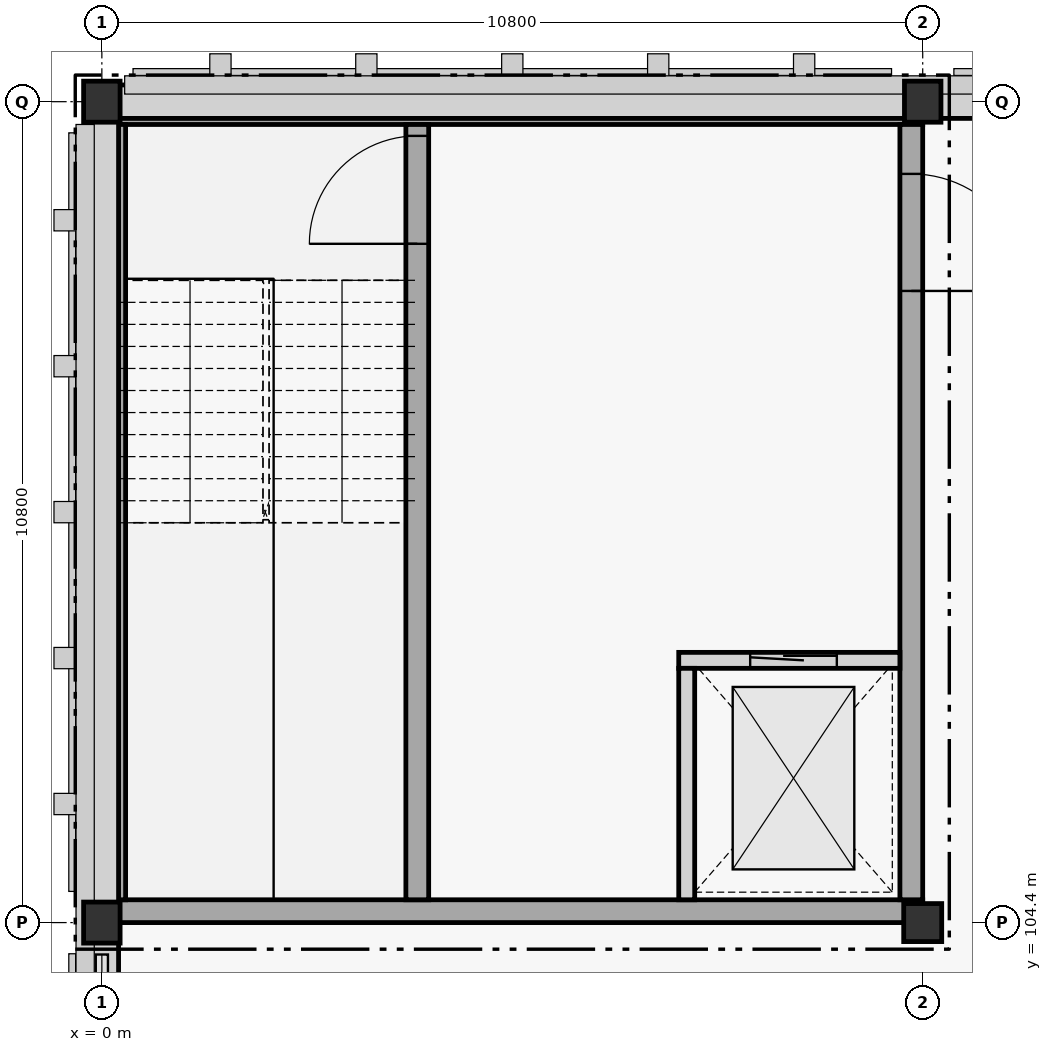
"""IFC4 building model, lengths in metres.
Left out: names, types, materials, properties, quantities, classifications, styles, units other than length and angle.
Written with IfcOpenShell. Run it as: python <this file> out.ifc"""

import sys

from ifc_helpers import new_model, si_unit, direction, frame, frame_2d, origin, origin_2d, place, context, subcontext, project, spatial, rectangle, extrude, element, fill, save


model = new_model("IFC4")
c1 = context("Model", 3, precision=1e-05, world=origin(), true_north=direction((0.0, 1.0)))
c2 = subcontext(c1, "Body", "Model", "MODEL_VIEW")
j1 = project(units=[si_unit("LENGTHUNIT", "METRE"), si_unit("PLANEANGLEUNIT", "RADIAN")], contexts=[c1])
p1 = place(None, origin())
s1 = spatial("IfcSite", under=j1, at=p1, CompositionType="ELEMENT")
p2 = place(p1, origin())
s2 = spatial("IfcBuilding", under=s1, at=p2, CompositionType="ELEMENT")
p3 = place(p2, frame((0.0, 0.0, 19.2)))
s3 = spatial("IfcBuildingStorey", under=s2, at=p3, CompositionType="ELEMENT", Elevation=19.2)
for number, where, z_axis, x_axis in (
    (1, (0.0, 104.4, 0.0), (0.0, 0.0, 1.0), (1.0, 0.0, 0.0)),
    (2, (0.0, 115.2, 0.0), (0.0, 0.0, 1.0), (1.0, 0.0, 0.0)),
):
    element("IfcColumn", number, at=place(p3, frame(where, z_axis=z_axis, x_axis=x_axis)), inside=s3, PredefinedType="COLUMN", context=c2, shape_type="SweptSolid", body=[
        extrude(rectangle(XDim=0.48, YDim=0.54, at=origin_2d()), origin(), (0.0, 0.0, 1.0), 4.2),
    ])
p4 = place(p3, frame((10.8, 104.4, 0.0), z_axis=(0.0, 0.0, 1.0), x_axis=(1.0, 0.0, 0.0)))
e3 = element("IfcColumn", 3, at=p4, inside=s3, PredefinedType="COLUMN", context=c2, shape_type="SweptSolid", body=[
    extrude(rectangle(XDim=0.5, YDim=0.5, at=origin_2d()), origin(), (0.0, 0.0, 1.0), 4.2),
])
p5 = place(p3, frame((10.8, 115.2, 0.0), z_axis=(0.0, 0.0, 1.0), x_axis=(1.0, 0.0, 0.0)))
e4 = element("IfcColumn", 4, at=p5, inside=s3, PredefinedType="COLUMN", context=c2, shape_type="SweptSolid", body=[
    extrude(rectangle(XDim=0.48, YDim=0.54, at=origin_2d()), origin(), (0.0, 0.0, 1.0), 4.2),
])
for number, where, z_axis, x_axis in (
    (5, (10.8, 104.55, 0.0), (0.0, 0.0, 1.0), (-1.0, 0.0, 0.0)),
    (6, (0.0, 115.05, 0.0), (0.0, 0.0, 1.0), (1.0, 0.0, 0.0)),
):
    element("IfcWall", number, at=place(p3, frame(where, z_axis=z_axis, x_axis=x_axis)), inside=s3, PredefinedType="SHEAR", context=c2, shape_type="SweptSolid", body=[
        extrude(rectangle(XDim=10.8, YDim=0.3, at=frame_2d((5.4, 0.0))), origin(), (0.0, 0.0, 1.0), 4.2),
    ])
p6 = place(p3, frame((0.15, 104.7, 0.0), z_axis=(0.0, 0.0, 1.0), x_axis=(0.0, 1.0, 0.0)))
e7 = element("IfcWall", 7, at=p6, inside=s3, PredefinedType="SHEAR", context=c2, shape_type="SweptSolid", body=[
    extrude(rectangle(XDim=10.2, YDim=0.325, at=frame_2d((5.1, 0.0))), origin(), (0.0, 0.0, 1.0), 4.2),
])
p7 = place(p3, frame((10.65, 114.9, 0.0), z_axis=(0.0, 0.0, 1.0), x_axis=(0.0, -1.0, 0.0)))
e8 = element("IfcWall", 8, at=p7, inside=s3, PredefinedType="SHEAR", context=c2, shape_type="SweptSolid", body=[
    extrude(rectangle(XDim=10.2, YDim=0.3, at=frame_2d((5.1, 0.0))), origin(), (0.0, 0.0, 1.0), 4.2),
])
p8 = place(p7, frame((0.65, 0.0, 0.0)))
e9 = element("IfcOpeningElement", 9, at=p8, cuts=e8, PredefinedType="OPENING", context=c2, shape_type="SweptSolid", body=[
    extrude(rectangle(XDim=1.54, YDim=2.22, at=frame_2d((0.77, 1.11))), frame((0.0, 0.15, 0.0), z_axis=(0.0, -1.0, 0.0), x_axis=(1.0, 0.0, 0.0)), (0.0, 0.0, 1.0), 0.3),
])
p9 = place(p3, frame((4.15, 104.7, 0.0), z_axis=(0.0, 0.0, 1.0), x_axis=(0.0, 1.0, 0.0)))
e10 = element("IfcWall", 10, at=p9, inside=s3, PredefinedType="SHEAR", context=c2, shape_type="SweptSolid", body=[
    extrude(rectangle(XDim=10.2, YDim=0.3, at=frame_2d((5.1, 0.0))), origin(), (0.0, 0.0, 1.0), 4.2),
])
p10 = place(p9, frame((8.63, 0.0, 0.0)))
e11 = element("IfcOpeningElement", 11, at=p10, cuts=e10, PredefinedType="OPENING", context=c2, shape_type="SweptSolid", body=[
    extrude(rectangle(XDim=1.42, YDim=2.2, at=frame_2d((0.71, 1.1))), frame((0.0, 0.15, 0.0), z_axis=(0.0, -1.0, 0.0), x_axis=(1.0, 0.0, 0.0)), (0.0, 0.0, 1.0), 0.3),
])
p11 = place(p3, frame((11.036, 115.2, 0.0), z_axis=(0.0, 0.0, 1.0), x_axis=(1.0, 0.0, 0.0)))
e12 = element("IfcWall", 12, at=p11, inside=s3, PredefinedType="STANDARD", context=c2, shape_type="SweptSolid", body=[
    extrude(rectangle(XDim=10.328, YDim=0.38, at=frame_2d((5.164, 0.0))), origin(), (0.0, 0.0, 1.0), 3.155),
])
p12 = place(p11, frame((4.604, 0.0, 0.9)))
e13 = element("IfcOpeningElement", 13, at=p12, cuts=e12, PredefinedType="OPENING", context=c2, shape_type="SweptSolid", body=[
    extrude(rectangle(XDim=1.12, YDim=2.02, at=frame_2d((0.56, 1.01))), frame((0.0, 0.19, 0.0), z_axis=(0.0, -1.0, 0.0), x_axis=(1.0, 0.0, 0.0)), (0.0, 0.0, 1.0), 0.38),
])
p13 = place(p3, frame((0.1, 115.2, 4.2), z_axis=(0.0, 0.0, 1.0), x_axis=(1.0, 0.0, 0.0)))
e14 = element("IfcWall", 14, at=p13, inside=s3, PredefinedType="PARAPET", context=c2, shape_type="SweptSolid", body=[
    extrude(rectangle(XDim=64.6, YDim=0.44, at=frame_2d((32.3, 0.0))), origin(), (0.0, 0.0, 1.0), 0.95),
])
p14 = place(p3, frame((0.0, 97.3, 4.2), z_axis=(0.0, 0.0, 1.0), x_axis=(0.0, 1.0, 0.0)))
e15 = element("IfcWall", 15, at=p14, inside=s3, PredefinedType="PARAPET", context=c2, shape_type="SweptSolid", body=[
    extrude(rectangle(XDim=17.8, YDim=0.44, at=frame_2d((8.9, 0.0))), origin(), (0.0, 0.0, 1.0), 0.95),
])
p15 = place(p3, frame((7.59, 107.85, 0.0), z_axis=(0.0, 0.0, 1.0), x_axis=(1.0, 0.0, 0.0)))
e16 = element("IfcWall", 16, at=p15, inside=s3, PredefinedType="STANDARD", context=c2, shape_type="SweptSolid", body=[
    extrude(rectangle(XDim=2.91, YDim=0.21, at=frame_2d((1.455, 0.0))), origin(), (0.0, 0.0, 1.0), 4.2),
])
p16 = place(p15, frame((0.94, 0.0, 0.0)))
e17 = element("IfcOpeningElement", 17, at=p16, cuts=e16, PredefinedType="OPENING", context=c2, shape_type="SweptSolid", body=[
    extrude(rectangle(XDim=1.14, YDim=2.16, at=frame_2d((0.57, 1.08))), frame((0.0, 0.105, 0.0), z_axis=(0.0, -1.0, 0.0), x_axis=(1.0, 0.0, 0.0)), (0.0, 0.0, 1.0), 0.21),
])
p17 = place(p3, frame((7.695, 104.7, 0.0), z_axis=(0.0, 0.0, 1.0), x_axis=(0.0, 1.0, 0.0)))
e18 = element("IfcWall", 18, at=p17, inside=s3, PredefinedType="STANDARD", context=c2, shape_type="SweptSolid", body=[
    extrude(rectangle(XDim=3.045, YDim=0.21, at=frame_2d((1.522, 0.0))), origin(), (0.0, 0.0, 1.0), 4.2),
])
p18 = place(p16, origin())
e19 = element("IfcDoor", 19, at=p18, inside=s3, OperationType="SLIDING_TO_LEFT", PredefinedType="DOOR", context=c2, shape_type="SweptSolid", body=[
    extrude(rectangle(XDim=1.14, YDim=2.16, at=frame_2d((0.57, 1.08))), frame((0.0, 0.025, 0.0), z_axis=(0.0, -1.0, 0.0), x_axis=(1.0, 0.0, 0.0)), (0.0, 0.0, 1.0), 0.05),
])
fill(e17, e19)
p19 = place(p10, origin())
e20 = element("IfcDoor", 20, at=p19, inside=s3, OperationType="SINGLE_SWING_LEFT", PredefinedType="DOOR", context=c2, shape_type="SweptSolid", body=[
    extrude(rectangle(XDim=1.42, YDim=2.2, at=frame_2d((0.71, 1.1))), frame((0.0, 0.025, 0.0), z_axis=(0.0, -1.0, 0.0), x_axis=(1.0, 0.0, 0.0)), (0.0, 0.0, 1.0), 0.05),
])
fill(e11, e20)
p20 = place(p8, origin())
e21 = element("IfcDoor", 21, at=p20, inside=s3, OperationType="SINGLE_SWING_RIGHT", PredefinedType="DOOR", context=c2, shape_type="SweptSolid", body=[
    extrude(rectangle(XDim=1.54, YDim=2.22, at=frame_2d((0.77, 1.11))), frame((0.0, 0.025, 0.0), z_axis=(0.0, -1.0, 0.0), x_axis=(1.0, 0.0, 0.0)), (0.0, 0.0, 1.0), 0.05),
])
fill(e9, e21)
save(model, sys.argv[1])
